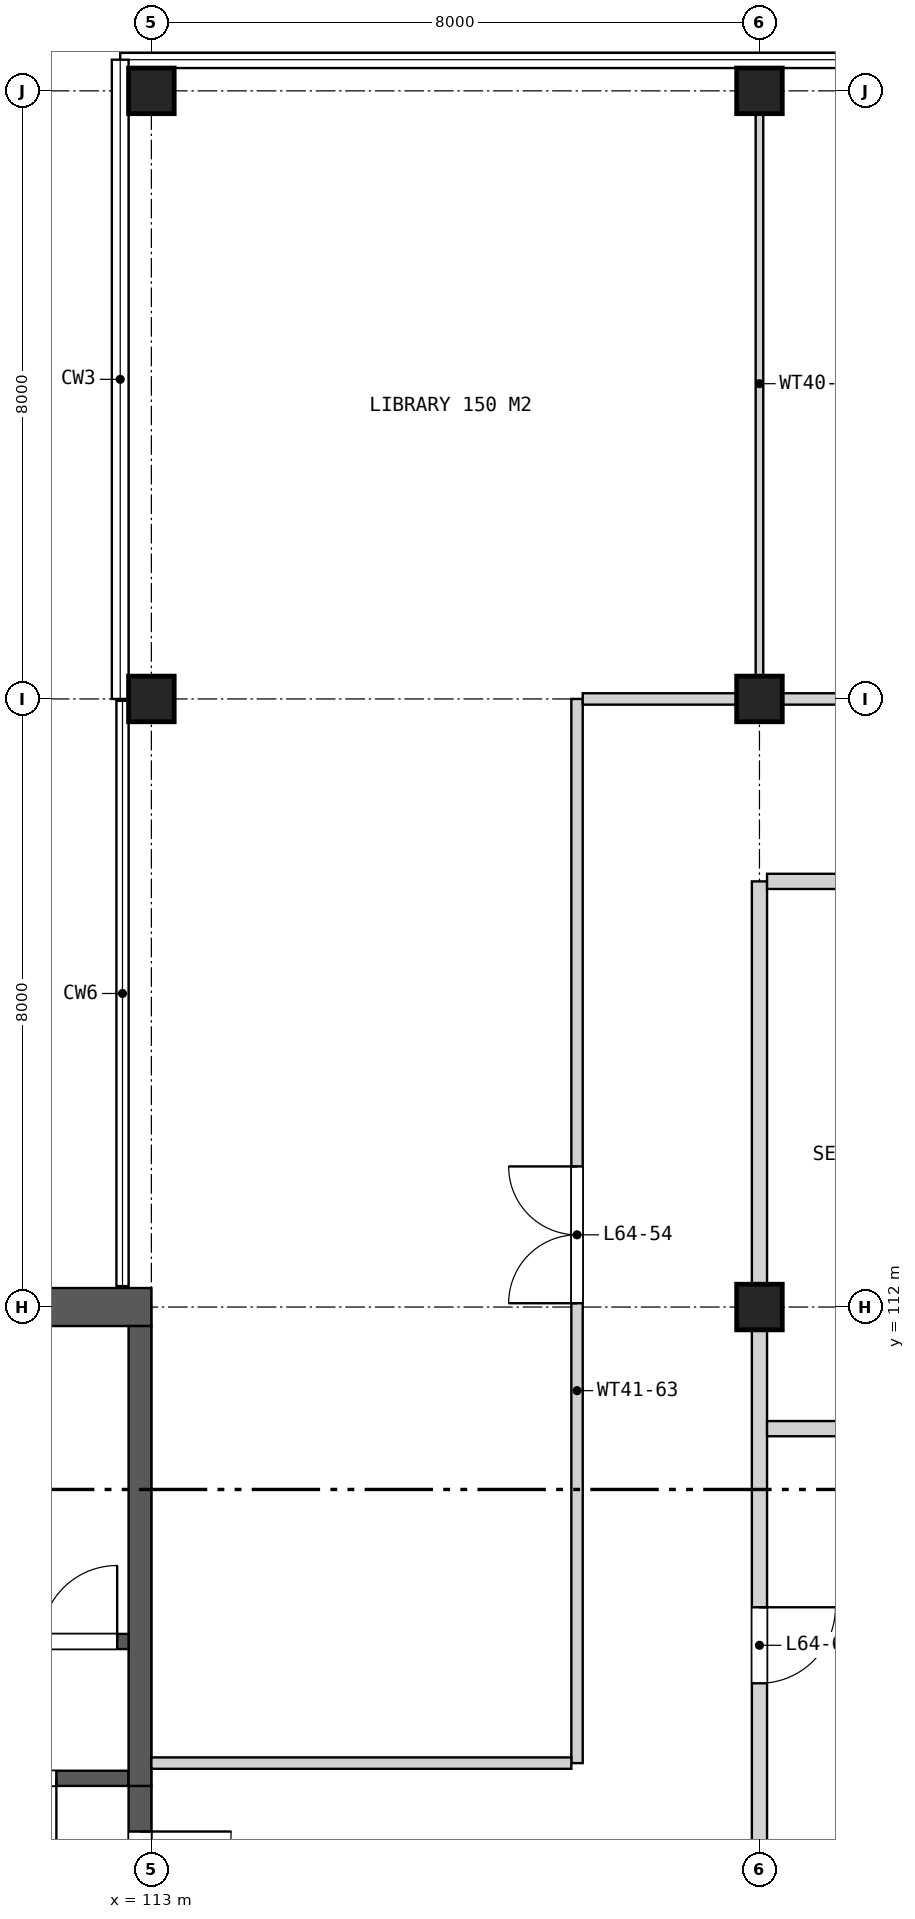
"""IFC4 building model, lengths in metres.
Left out: names, types, materials, properties, quantities, classifications, styles, units other than length and angle.
Written with IfcOpenShell. Run it as: python <this file> out.ifc"""

import sys

from ifc_helpers import new_model, si_unit, direction, frame, frame_2d, origin, origin_2d, place, context, subcontext, project, spatial, rectangle, extrude, element, fill, save


model = new_model("IFC4")
c1 = context("Model", 3, precision=1e-05, world=origin(), true_north=direction((0.0, 1.0)))
c2 = subcontext(c1, "Body", "Model", "MODEL_VIEW")
j1 = project(units=[si_unit("LENGTHUNIT", "METRE"), si_unit("PLANEANGLEUNIT", "RADIAN")], contexts=[c1])
p1 = place(None, origin())
s1 = spatial("IfcSite", under=j1, at=p1, CompositionType="ELEMENT")
p2 = place(p1, origin())
s2 = spatial("IfcBuilding", under=s1, at=p2, CompositionType="ELEMENT")
p3 = place(p2, frame((0.0, 0.0, 295.5)))
s3 = spatial("IfcBuildingStorey", under=s2, at=p3, CompositionType="ELEMENT", Elevation=295.5)
for number, where, z_axis, x_axis in (
    (1, (113.0, 120.0, 0.0), (0.0, 0.0, 1.0), (1.0, 0.0, 0.0)),
    (2, (113.0, 128.0, 0.0), (0.0, 0.0, 1.0), (1.0, 0.0, 0.0)),
    (3, (121.0, 112.0, 0.0), (0.0, 0.0, 1.0), (1.0, 0.0, 0.0)),
    (4, (121.0, 120.0, 0.0), (0.0, 0.0, 1.0), (1.0, 0.0, 0.0)),
    (5, (121.0, 128.0, 0.0), (0.0, 0.0, 1.0), (1.0, 0.0, 0.0)),
):
    element("IfcColumn", number, at=place(p3, frame(where, z_axis=z_axis, x_axis=x_axis)), inside=s3, PredefinedType="COLUMN", context=c2, shape_type="SweptSolid", body=[
        extrude(rectangle(XDim=0.6, YDim=0.6, at=origin_2d()), origin(), (0.0, 0.0, 1.0), 4.2),
    ])
p4 = place(p3, frame((113.0, 112.0, 0.0), z_axis=(0.0, 0.0, 1.0), x_axis=(-1.0, 0.0, 0.0)))
e6 = element("IfcWall", 6, at=p4, inside=s3, PredefinedType="SHEAR", context=c2, shape_type="SweptSolid", body=[
    extrude(rectangle(XDim=7.1, YDim=0.5, at=frame_2d((3.55, 0.0))), origin(), (0.0, 0.0, 1.0), 4.2),
])
p5 = place(p3, frame((112.85, 105.7, 0.0), z_axis=(0.0, 0.0, 1.0), x_axis=(0.0, -1.0, 0.0)))
e7 = element("IfcWall", 7, at=p5, inside=s3, PredefinedType="SHEAR", context=c2, shape_type="SweptSolid", body=[
    extrude(rectangle(XDim=11.4, YDim=0.3, at=frame_2d((5.7, 0.0))), origin(), (0.0, 0.0, 1.0), 4.2),
])
p6 = place(p5, frame((0.6, 0.0, 0.0)))
e8 = element("IfcOpeningElement", 8, at=p6, cuts=e7, PredefinedType="OPENING", context=c2, shape_type="SweptSolid", body=[
    extrude(rectangle(XDim=2.4, YDim=2.4, at=frame_2d((1.2, 1.2))), frame((0.0, 0.16, 0.0), z_axis=(0.0, -1.0, 0.0), x_axis=(1.0, 0.0, 0.0)), (0.0, 0.0, 1.0), 0.32),
])
p7 = place(p5, frame((4.5, 0.0, 0.0)))
e9 = element("IfcOpeningElement", 9, at=p7, cuts=e7, PredefinedType="OPENING", context=c2, shape_type="SweptSolid", body=[
    extrude(rectangle(XDim=2.4, YDim=2.4, at=frame_2d((1.2, 1.2))), frame((0.0, 0.16, 0.0), z_axis=(0.0, -1.0, 0.0), x_axis=(1.0, 0.0, 0.0)), (0.0, 0.0, 1.0), 0.32),
])
p8 = place(p5, frame((8.4, 0.0, 0.0)))
e10 = element("IfcOpeningElement", 10, at=p8, cuts=e7, PredefinedType="OPENING", context=c2, shape_type="SweptSolid", body=[
    extrude(rectangle(XDim=2.4, YDim=2.4, at=frame_2d((1.2, 1.2))), frame((0.0, 0.16, 0.0), z_axis=(0.0, -1.0, 0.0), x_axis=(1.0, 0.0, 0.0)), (0.0, 0.0, 1.0), 0.32),
])
p9 = place(p3, frame((112.7, 105.8, 0.0), z_axis=(0.0, 0.0, 1.0), x_axis=(-1.0, 0.0, 0.0)))
e11 = element("IfcWall", 11, at=p9, inside=s3, PredefinedType="SHEAR", context=c2, shape_type="SweptSolid", body=[
    extrude(rectangle(XDim=15.45, YDim=0.2, at=frame_2d((7.725, 0.0))), origin(), (0.0, 0.0, 1.0), 4.2),
])
p10 = place(p9, frame((0.95, 0.0, 0.0)))
e12 = element("IfcOpeningElement", 12, at=p10, cuts=e11, PredefinedType="OPENING", context=c2, shape_type="SweptSolid", body=[
    extrude(rectangle(XDim=1.1, YDim=2.1, at=frame_2d((0.55, 1.05))), frame((0.0, 0.11, 0.0), z_axis=(0.0, -1.0, 0.0), x_axis=(1.0, 0.0, 0.0)), (0.0, 0.0, 1.0), 0.22),
])
p11 = place(p3, frame((112.85, 111.75, 0.0), z_axis=(0.0, 0.0, 1.0), x_axis=(0.0, -1.0, 0.0)))
e13 = element("IfcWall", 13, at=p11, inside=s3, PredefinedType="SHEAR", context=c2, shape_type="SweptSolid", body=[
    extrude(rectangle(XDim=6.05, YDim=0.3, at=frame_2d((3.025, 0.0))), origin(), (0.0, 0.0, 1.0), 4.2),
])
p12 = place(p3, frame((112.7, 107.6, 0.0), z_axis=(0.0, 0.0, 1.0), x_axis=(-1.0, 0.0, 0.0)))
e14 = element("IfcWall", 14, at=p12, inside=s3, PredefinedType="SHEAR", context=c2, shape_type="SweptSolid", body=[
    extrude(rectangle(XDim=6.8, YDim=0.2, at=frame_2d((3.4, 0.0))), origin(), (0.0, 0.0, 1.0), 4.2),
])
p13 = place(p12, frame((0.15, 0.0, 0.0)))
e15 = element("IfcOpeningElement", 15, at=p13, cuts=e14, PredefinedType="OPENING", context=c2, shape_type="SweptSolid", body=[
    extrude(rectangle(XDim=1.0, YDim=2.1, at=frame_2d((0.5, 1.05))), frame((0.0, 0.11, 0.0), z_axis=(0.0, -1.0, 0.0), x_axis=(1.0, 0.0, 0.0)), (0.0, 0.0, 1.0), 0.22),
])
p14 = place(p3, frame((118.6, 106.0, 0.0), z_axis=(0.0, 0.0, 1.0), x_axis=(0.0, 1.0, 0.0)))
e16 = element("IfcWall", 16, at=p14, inside=s3, PredefinedType="PARTITIONING", context=c2, shape_type="SweptSolid", body=[
    extrude(rectangle(XDim=14.0, YDim=0.15, at=frame_2d((7.0, 0.0))), origin(), (0.0, 0.0, 1.0), 3.443),
])
p15 = place(p14, frame((6.05, 0.0, 0.0)))
e17 = element("IfcOpeningElement", 17, at=p15, cuts=e16, PredefinedType="OPENING", context=c2, shape_type="SweptSolid", body=[
    extrude(rectangle(XDim=1.8, YDim=2.1, at=frame_2d((0.9, 1.05))), frame((0.0, 0.085, 0.0), z_axis=(0.0, -1.0, 0.0), x_axis=(1.0, 0.0, 0.0)), (0.0, 0.0, 1.0), 0.17),
])
p16 = place(p3, frame((121.0, 82.4, 0.0), z_axis=(0.0, 0.0, 1.0), x_axis=(0.0, 1.0, 0.0)))
e18 = element("IfcWall", 18, at=p16, inside=s3, PredefinedType="SOLIDWALL", context=c2, shape_type="SweptSolid", body=[
    extrude(rectangle(XDim=35.2, YDim=0.2, at=frame_2d((17.6, 0.0))), origin(), (0.0, 0.0, 1.0), 3.443),
])
p17 = place(p16, frame((7.45, 0.0, 0.0)))
e19 = element("IfcOpeningElement", 19, at=p17, cuts=e18, PredefinedType="OPENING", context=c2, shape_type="SweptSolid", body=[
    extrude(rectangle(XDim=1.0, YDim=2.1, at=frame_2d((0.5, 1.05))), frame((0.0, 0.11, 0.0), z_axis=(0.0, -1.0, 0.0), x_axis=(1.0, 0.0, 0.0)), (0.0, 0.0, 1.0), 0.22),
])
p18 = place(p16, frame((18.25, 0.0, 0.0)))
e20 = element("IfcOpeningElement", 20, at=p18, cuts=e18, PredefinedType="OPENING", context=c2, shape_type="SweptSolid", body=[
    extrude(rectangle(XDim=1.0, YDim=2.1, at=frame_2d((0.5, 1.05))), frame((0.0, 0.11, 0.0), z_axis=(0.0, -1.0, 0.0), x_axis=(1.0, 0.0, 0.0)), (0.0, 0.0, 1.0), 0.22),
])
p19 = place(p16, frame((24.65, 0.0, 0.0)))
e21 = element("IfcOpeningElement", 21, at=p19, cuts=e18, PredefinedType="OPENING", context=c2, shape_type="SweptSolid", body=[
    extrude(rectangle(XDim=1.0, YDim=2.1, at=frame_2d((0.5, 1.05))), frame((0.0, 0.11, 0.0), z_axis=(0.0, -1.0, 0.0), x_axis=(1.0, 0.0, 0.0)), (0.0, 0.0, 1.0), 0.22),
])
p20 = place(p3, frame((121.0, 120.075, 0.0), z_axis=(0.0, 0.0, 1.0), x_axis=(0.0, 1.0, 0.0)))
e22 = element("IfcWall", 22, at=p20, inside=s3, PredefinedType="PARTITIONING", context=c2, shape_type="SweptSolid", body=[
    extrude(rectangle(XDim=8.145, YDim=0.1, at=frame_2d((4.073, 0.0))), origin(), (0.0, 0.0, 1.0), 3.443),
])
p21 = place(p3, frame((113.0, 106.0, 0.0), z_axis=(0.0, 0.0, 1.0), x_axis=(1.0, 0.0, 0.0)))
e23 = element("IfcWall", 23, at=p21, inside=s3, PredefinedType="PARTITIONING", context=c2, shape_type="SweptSolid", body=[
    extrude(rectangle(XDim=5.525, YDim=0.15, at=frame_2d((2.762, 0.0))), origin(), (0.0, 0.0, 1.0), 3.443),
])
p22 = place(p3, frame((121.1, 117.6, 0.0), z_axis=(0.0, 0.0, 1.0), x_axis=(1.0, 0.0, 0.0)))
e24 = element("IfcWall", 24, at=p22, inside=s3, PredefinedType="SOLIDWALL", context=c2, shape_type="SweptSolid", body=[
    extrude(rectangle(XDim=7.9, YDim=0.2, at=frame_2d((3.95, 0.0))), origin(), (0.0, 0.0, 1.0), 3.443),
])
p23 = place(p22, frame((1.45, 0.0, 0.0)))
e25 = element("IfcOpeningElement", 25, at=p23, cuts=e24, PredefinedType="OPENING", context=c2, shape_type="SweptSolid", body=[
    extrude(rectangle(XDim=1.0, YDim=2.1, at=frame_2d((0.5, 1.05))), frame((0.0, 0.11, 0.0), z_axis=(0.0, -1.0, 0.0), x_axis=(1.0, 0.0, 0.0)), (0.0, 0.0, 1.0), 0.22),
])
p24 = place(p22, frame((5.35, 0.0, 0.0)))
e26 = element("IfcOpeningElement", 26, at=p24, cuts=e24, PredefinedType="OPENING", context=c2, shape_type="SweptSolid", body=[
    extrude(rectangle(XDim=1.0, YDim=2.1, at=frame_2d((0.5, 1.05))), frame((0.0, 0.11, 0.0), z_axis=(0.0, -1.0, 0.0), x_axis=(1.0, 0.0, 0.0)), (0.0, 0.0, 1.0), 0.22),
])
p25 = place(p3, frame((118.675, 120.0, 0.0), z_axis=(0.0, 0.0, 1.0), x_axis=(1.0, 0.0, 0.0)))
e27 = element("IfcWall", 27, at=p25, inside=s3, PredefinedType="PARTITIONING", context=c2, shape_type="SweptSolid", body=[
    extrude(rectangle(XDim=18.545, YDim=0.15, at=frame_2d((9.272, 0.0))), origin(), (0.0, 0.0, 1.0), 3.443),
])
p26 = place(p25, frame((5.375, 0.0, 0.0)))
e28 = element("IfcOpeningElement", 28, at=p26, cuts=e27, PredefinedType="OPENING", context=c2, shape_type="SweptSolid", body=[
    extrude(rectangle(XDim=1.8, YDim=2.1, at=frame_2d((0.9, 1.05))), frame((0.0, 0.085, 0.0), z_axis=(0.0, -1.0, 0.0), x_axis=(1.0, 0.0, 0.0)), (0.0, 0.0, 1.0), 0.17),
])
p27 = place(p3, frame((121.1, 110.4, 0.0), z_axis=(0.0, 0.0, 1.0), x_axis=(1.0, 0.0, 0.0)))
e29 = element("IfcWall", 29, at=p27, inside=s3, PredefinedType="SOLIDWALL", context=c2, shape_type="SweptSolid", body=[
    extrude(rectangle(XDim=3.8, YDim=0.2, at=frame_2d((1.9, 0.0))), origin(), (0.0, 0.0, 1.0), 3.443),
])
p28 = place(p6, origin())
e30 = element("IfcDoor", 30, at=p28, inside=s3, OperationType="DOUBLE_DOOR_SINGLE_SWING", PredefinedType="DOOR", context=c2, shape_type="SweptSolid", body=[
    extrude(rectangle(XDim=2.4, YDim=2.4, at=frame_2d((1.2, 1.2))), frame((0.0, 0.025, 0.0), z_axis=(0.0, -1.0, 0.0), x_axis=(1.0, 0.0, 0.0)), (0.0, 0.0, 1.0), 0.05),
])
fill(e8, e30)
p29 = place(p10, origin())
e31 = element("IfcDoor", 31, at=p29, inside=s3, OperationType="SINGLE_SWING_LEFT", PredefinedType="DOOR", context=c2, shape_type="SweptSolid", body=[
    extrude(rectangle(XDim=1.1, YDim=2.1, at=frame_2d((0.55, 1.05))), frame((0.0, 0.025, 0.0), z_axis=(0.0, -1.0, 0.0), x_axis=(1.0, 0.0, 0.0)), (0.0, 0.0, 1.0), 0.05),
])
fill(e12, e31)
p30 = place(p13, frame((1.0, 0.0, 0.0), z_axis=(0.0, 0.0, 1.0), x_axis=(-1.0, 0.0, 0.0)))
e32 = element("IfcDoor", 32, at=p30, inside=s3, OperationType="SINGLE_SWING_RIGHT", PredefinedType="DOOR", context=c2, shape_type="SweptSolid", body=[
    extrude(rectangle(XDim=1.0, YDim=2.1, at=frame_2d((0.5, 1.05))), frame((0.0, 0.025, 0.0), z_axis=(0.0, -1.0, 0.0), x_axis=(1.0, 0.0, 0.0)), (0.0, 0.0, 1.0), 0.05),
])
fill(e15, e32)
p31 = place(p15, origin())
e33 = element("IfcDoor", 33, at=p31, inside=s3, OperationType="DOUBLE_DOOR_SINGLE_SWING", PredefinedType="DOOR", context=c2, shape_type="SweptSolid", body=[
    extrude(rectangle(XDim=1.8, YDim=2.1, at=frame_2d((0.9, 1.05))), frame((0.0, 0.025, 0.0), z_axis=(0.0, -1.0, 0.0), x_axis=(1.0, 0.0, 0.0)), (0.0, 0.0, 1.0), 0.05),
])
fill(e17, e33)
p32 = place(p19, frame((1.0, 0.0, 0.0), z_axis=(0.0, 0.0, 1.0), x_axis=(-1.0, 0.0, 0.0)))
e34 = element("IfcDoor", 34, at=p32, inside=s3, OperationType="SINGLE_SWING_LEFT", PredefinedType="DOOR", context=c2, shape_type="SweptSolid", body=[
    extrude(rectangle(XDim=1.0, YDim=2.1, at=frame_2d((0.5, 1.05))), frame((0.0, 0.025, 0.0), z_axis=(0.0, -1.0, 0.0), x_axis=(1.0, 0.0, 0.0)), (0.0, 0.0, 1.0), 0.05),
])
fill(e21, e34)
save(model, sys.argv[1])
